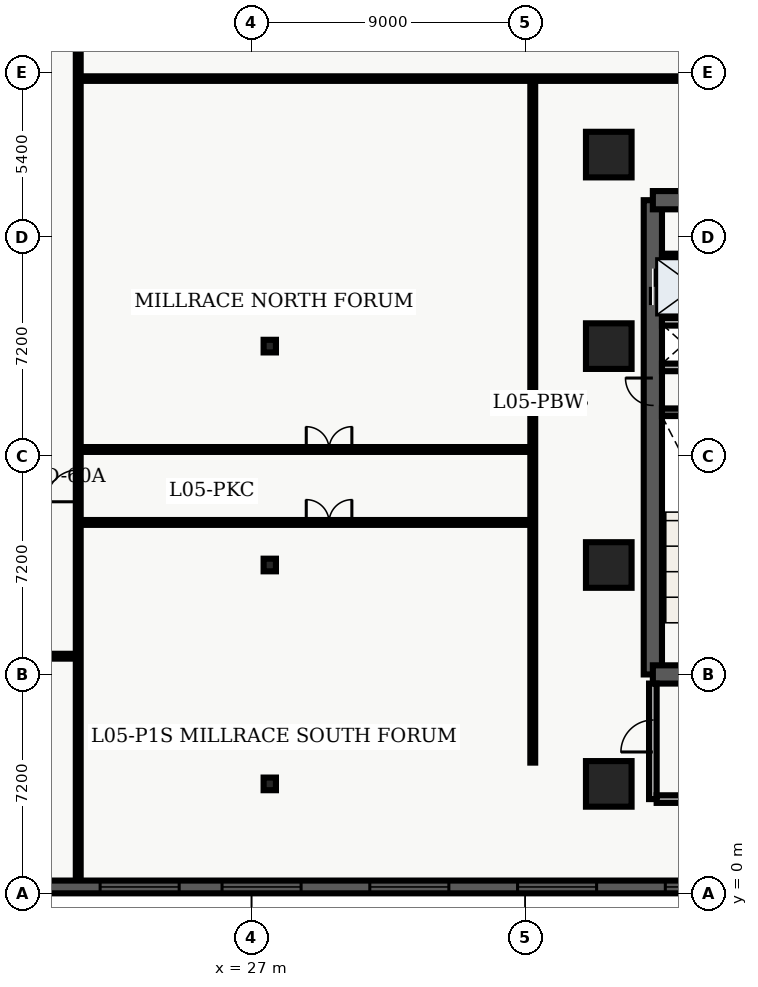
"""IFC4 building model, lengths in metres.
Left out: names, types, materials, properties, quantities, classifications, styles, units other than length and angle.
Written with IfcOpenShell. Run it as: python <this file> out.ifc"""

import sys

from ifc_helpers import new_model, entity, si_unit, converted_unit, direction, frame, origin_with_axes, origin_2d_with_axis, place, context, subcontext, project, spatial, polyline, rectangle, i_section, outline, extrude, element, fill, save


model = new_model("IFC4")
c1 = context("Model", 3, precision=1e-05, world=origin_with_axes(), true_north=direction((0.0, 1.0)))
c2 = subcontext(c1, "Body", "Model", "MODEL_VIEW")
j1 = project(units=[si_unit("LENGTHUNIT", "METRE"), converted_unit("PLANEANGLEUNIT", "DEGREE", entity("IfcPlaneAngleMeasure", 0.017), si_unit("PLANEANGLEUNIT", "RADIAN"), dimensions=[0, 0, 0, 0, 0, 0, 0])], contexts=[c1])
p1 = place(None, origin_with_axes())
s1 = spatial("IfcSite", under=j1, at=p1, CompositionType="ELEMENT")
p2 = place(p1, origin_with_axes())
s2 = spatial("IfcBuilding", under=s1, at=p2, CompositionType="ELEMENT")
p3 = place(p2, frame((0.0, 0.0, 24.3), z_axis=(0.0, 0.0, 1.0), x_axis=(1.0, 0.0, 0.0)))
s3 = spatial("IfcBuildingStorey", under=s2, at=p3, CompositionType="ELEMENT", Elevation=24.3)
p4 = place(p3, frame((40.2, 7.2, 0.0), z_axis=(0.0, 0.0, 1.0), x_axis=(0.0, 1.0, 0.0)))
e1 = element("IfcWall", 1, at=p4, inside=s3, PredefinedType="SHEAR", context=c2, shape_type="SweptSolid", body=[
    extrude(outline(polyline([(0.0, -0.3), (15.6, -0.3), (15.6, 0.3), (0.0, 0.3), (0.0, -0.3)])), origin_with_axes(), (0.0, 0.0, 1.0), 4.2),
])
p5 = place(p4, frame((12.75, 0.0, 0.0), z_axis=(0.0, 0.0, 1.0), x_axis=(1.0, 0.0, 0.0)))
e2 = element("IfcOpeningElement", 2, at=p5, cuts=e1, PredefinedType="OPENING", context=c2, shape_type="SweptSolid", body=[
    extrude(rectangle(XDim=1.2, YDim=0.62, at=origin_2d_with_axis()), origin_with_axes(), (0.0, 0.0, 1.0), 2.15),
])
p6 = place(p4, frame((9.3, 0.0, 0.0), z_axis=(0.0, 0.0, 1.0), x_axis=(1.0, 0.0, 0.0)))
e3 = element("IfcOpeningElement", 3, at=p6, cuts=e1, PredefinedType="OPENING", context=c2, shape_type="SweptSolid", body=[
    extrude(rectangle(XDim=0.9, YDim=0.62, at=origin_2d_with_axis()), origin_with_axes(), (0.0, 0.0, 1.0), 2.15),
])
p7 = place(p3, frame((40.2, 7.2, 0.0), z_axis=(0.0, 0.0, 1.0), x_axis=(1.0, 0.0, 0.0)))
e4 = element("IfcWall", 4, at=p7, inside=s3, PredefinedType="SHEAR", context=c2, shape_type="SweptSolid", body=[
    extrude(outline(polyline([(0.0, -0.3), (7.85, -0.3), (7.85, 0.3), (0.0, 0.3), (0.0, -0.3)])), origin_with_axes(), (0.0, 0.0, 1.0), 4.2),
])
p8 = place(p7, frame((2.175, 0.0, 0.0), z_axis=(0.0, 0.0, 1.0), x_axis=(1.0, 0.0, 0.0)))
e5 = element("IfcOpeningElement", 5, at=p8, cuts=e4, PredefinedType="OPENING", context=c2, shape_type="SweptSolid", body=[
    extrude(rectangle(XDim=1.05, YDim=0.62, at=origin_2d_with_axis()), origin_with_axes(), (0.0, 0.0, 1.0), 2.15),
])
p9 = place(p3, frame((40.2, 22.8, 0.0), z_axis=(0.0, 0.0, 1.0), x_axis=(1.0, 0.0, 0.0)))
e6 = element("IfcWall", 6, at=p9, inside=s3, PredefinedType="SHEAR", context=c2, shape_type="SweptSolid", body=[
    extrude(outline(polyline([(0.0, -0.3), (7.85, -0.3), (7.85, 0.3), (0.0, 0.3), (0.0, -0.3)])), origin_with_axes(), (0.0, 0.0, 1.0), 4.2),
])
p10 = place(p9, frame((5.775, 0.0, 0.0), z_axis=(0.0, 0.0, 1.0), x_axis=(1.0, 0.0, 0.0)))
e7 = element("IfcOpeningElement", 7, at=p10, cuts=e6, PredefinedType="OPENING", context=c2, shape_type="SweptSolid", body=[
    extrude(rectangle(XDim=1.05, YDim=0.62, at=origin_2d_with_axis()), origin_with_axes(), (0.0, 0.0, 1.0), 2.15),
])
p11 = place(p9, frame((2.15, 0.0, 0.0), z_axis=(0.0, 0.0, 1.0), x_axis=(1.0, 0.0, 0.0)))
e8 = element("IfcOpeningElement", 8, at=p11, cuts=e6, PredefinedType="OPENING", context=c2, shape_type="SweptSolid", body=[
    extrude(rectangle(XDim=0.9, YDim=0.62, at=origin_2d_with_axis()), origin_with_axes(), (0.0, 0.0, 1.0), 2.15),
])
p12 = place(p3, frame((40.5, 15.825, 0.0), z_axis=(0.0, 0.0, 1.0), x_axis=(1.0, 0.0, 0.0)))
e9 = element("IfcWall", 9, at=p12, inside=s3, PredefinedType="SHEAR", context=c2, shape_type="SweptSolid", body=[
    extrude(outline(polyline([(0.0, -0.125), (3.5, -0.125), (3.5, 0.125), (0.0, 0.125), (0.0, -0.125)])), origin_with_axes(), (0.0, 0.0, 1.0), 4.2),
])
p13 = place(p3, frame((40.5, 17.3, 0.0), z_axis=(0.0, 0.0, 1.0), x_axis=(1.0, 0.0, 0.0)))
e10 = element("IfcWall", 10, at=p13, inside=s3, PredefinedType="SOLIDWALL", context=c2, shape_type="SweptSolid", body=[
    extrude(outline(polyline([(0.0, -0.125), (3.5, -0.125), (3.5, 0.125), (0.0, 0.125), (0.0, -0.125)])), origin_with_axes(), (0.0, 0.0, 1.0), 3.24),
])
p14 = place(p13, frame((2.4, 0.0, 0.0), z_axis=(0.0, 0.0, 1.0), x_axis=(1.0, 0.0, 0.0)))
e11 = element("IfcOpeningElement", 11, at=p14, cuts=e10, PredefinedType="OPENING", context=c2, shape_type="SweptSolid", body=[
    extrude(rectangle(XDim=0.9, YDim=0.27, at=origin_2d_with_axis()), origin_with_axes(), (0.0, 0.0, 1.0), 2.15),
])
p15 = place(p3, frame((40.5, 18.8, 0.0), z_axis=(0.0, 0.0, 1.0), x_axis=(1.0, 0.0, 0.0)))
e12 = element("IfcWall", 12, at=p15, inside=s3, PredefinedType="SOLIDWALL", context=c2, shape_type="SweptSolid", body=[
    extrude(outline(polyline([(0.0, -0.125), (3.5, -0.125), (3.5, 0.125), (0.0, 0.125), (0.0, -0.125)])), origin_with_axes(), (0.0, 0.0, 1.0), 3.24),
])
p16 = place(p3, frame((40.2, 3.1, 0.0), z_axis=(0.0, 0.0, 1.0), x_axis=(0.0, 1.0, 0.0)))
e13 = element("IfcWall", 13, at=p16, inside=s3, PredefinedType="SOLIDWALL", context=c2, shape_type="SweptSolid", body=[
    extrude(outline(polyline([(0.0, -0.125), (3.8, -0.125), (3.8, 0.125), (0.0, 0.125), (0.0, -0.125)])), origin_with_axes(), (0.0, 0.0, 1.0), 3.24),
])
p17 = place(p16, frame((2.075, 0.0, 0.0), z_axis=(0.0, 0.0, 1.0), x_axis=(1.0, 0.0, 0.0)))
e14 = element("IfcOpeningElement", 14, at=p17, cuts=e13, PredefinedType="OPENING", context=c2, shape_type="SweptSolid", body=[
    extrude(rectangle(XDim=1.05, YDim=0.27, at=origin_2d_with_axis()), origin_with_axes(), (0.0, 0.0, 1.0), 2.15),
])
p18 = place(p3, frame((40.325, 3.1, 0.0), z_axis=(0.0, 0.0, 1.0), x_axis=(1.0, 0.0, 0.0)))
e15 = element("IfcWall", 15, at=p18, inside=s3, PredefinedType="SOLIDWALL", context=c2, shape_type="SweptSolid", body=[
    extrude(outline(polyline([(0.0, -0.125), (3.95, -0.125), (3.95, 0.125), (0.0, 0.125), (0.0, -0.125)])), origin_with_axes(), (0.0, 0.0, 1.0), 3.24),
])
for number, where, z_axis, x_axis in (
    (16, (27.6, 3.6, 0.0), (0.0, 0.0, 1.0), (1.0, 0.0, 0.0)),
    (17, (27.6, 10.8, 0.0), (0.0, 0.0, 1.0), (1.0, 0.0, 0.0)),
    (18, (27.6, 18.0, 0.0), (0.0, 0.0, 1.0), (1.0, 0.0, 0.0)),
):
    element("IfcColumn", number, at=place(p3, frame(where, z_axis=z_axis, x_axis=x_axis)), inside=s3, PredefinedType="COLUMN", context=c2, shape_type="SweptSolid", body=[
        extrude(i_section(OverallWidth=0.406, OverallDepth=0.416, WebThickness=0.03, FlangeThickness=0.048, FilletRadius=0.022, at=origin_2d_with_axis()), origin_with_axes(), (0.0, 0.0, 1.0), 4.5),
    ])
for number, where, z_axis, x_axis in (
    (19, (38.75, 3.6, 0.0), (0.0, 0.0, 1.0), (1.0, 0.0, 0.0)),
    (20, (38.75, 10.8, 0.0), (0.0, 0.0, 1.0), (1.0, 0.0, 0.0)),
    (21, (38.75, 18.0, 0.0), (0.0, 0.0, 1.0), (1.0, 0.0, 0.0)),
    (22, (38.75, 24.3, 0.0), (0.0, 0.0, 1.0), (1.0, 0.0, 0.0)),
):
    element("IfcColumn", number, at=place(p3, frame(where, z_axis=z_axis, x_axis=x_axis)), inside=s3, PredefinedType="COLUMN", context=c2, shape_type="SweptSolid", body=[
        extrude(rectangle(XDim=1.5, YDim=1.5, at=origin_2d_with_axis()), origin_with_axes(), (0.0, 0.0, 1.0), 4.5),
    ])
p19 = place(p3, frame((40.5, 20.96, 0.0), z_axis=(0.0, 0.0, 1.0), x_axis=(1.0, 0.0, 0.0)))
e23 = element("IfcWall", 23, at=p19, inside=s3, PredefinedType="PARTITIONING", context=c2, shape_type="SweptSolid", body=[
    extrude(outline(polyline([(0.0, -0.08), (3.5, -0.08), (3.5, 0.08), (0.0, 0.08), (0.0, -0.08)])), origin_with_axes(), (0.0, 0.0, 1.0), 3.2),
])
p20 = place(p3, frame((0.38, 7.8, 0.0), z_axis=(0.0, 0.0, 1.0), x_axis=(1.0, 0.0, 0.0)))
e24 = element("IfcWall", 24, at=p20, inside=s3, PredefinedType="PARTITIONING", context=c2, shape_type="SweptSolid", body=[
    extrude(outline(polyline([(0.0, -0.08), (20.92, -0.08), (20.92, 0.08), (0.0, 0.08), (0.0, -0.08)])), origin_with_axes(), (0.0, 0.0, 1.0), 3.2),
])
p21 = place(p20, frame((3.7, 0.0, 0.0), z_axis=(0.0, 0.0, 1.0), x_axis=(1.0, 0.0, 0.0)))
e25 = element("IfcOpeningElement", 25, at=p21, cuts=e24, PredefinedType="OPENING", context=c2, shape_type="SweptSolid", body=[
    extrude(rectangle(XDim=1.0, YDim=0.18, at=origin_2d_with_axis()), origin_with_axes(), (0.0, 0.0, 1.0), 2.15),
])
p22 = place(p20, frame((15.3, 0.0, 0.0), z_axis=(0.0, 0.0, 1.0), x_axis=(1.0, 0.0, 0.0)))
e26 = element("IfcOpeningElement", 26, at=p22, cuts=e24, PredefinedType="OPENING", context=c2, shape_type="SweptSolid", body=[
    extrude(rectangle(XDim=1.0, YDim=0.18, at=origin_2d_with_axis()), origin_with_axes(), (0.0, 0.0, 1.0), 2.15),
])
p23 = place(p3, frame((21.3, 0.38, 0.0), z_axis=(0.0, 0.0, 1.0), x_axis=(0.0, 1.0, 0.0)))
e27 = element("IfcWall", 27, at=p23, inside=s3, PredefinedType="PARTITIONING", context=c2, shape_type="SweptSolid", body=[
    extrude(outline(polyline([(0.0, -0.08), (35.24, -0.08), (35.24, 0.08), (0.0, 0.08), (0.0, -0.08)])), origin_with_axes(), (0.0, 0.0, 1.0), 3.2),
])
p24 = place(p23, frame((13.025, 0.0, 0.0), z_axis=(0.0, 0.0, 1.0), x_axis=(1.0, 0.0, 0.0)))
e28 = element("IfcOpeningElement", 28, at=p24, cuts=e27, PredefinedType="OPENING", context=c2, shape_type="SweptSolid", body=[
    extrude(rectangle(XDim=1.05, YDim=0.18, at=origin_2d_with_axis()), origin_with_axes(), (0.0, 0.0, 1.0), 2.15),
])
p25 = place(p23, frame((31.25, 0.0, 0.0), z_axis=(0.0, 0.0, 1.0), x_axis=(1.0, 0.0, 0.0)))
e29 = element("IfcOpeningElement", 29, at=p25, cuts=e27, PredefinedType="OPENING", context=c2, shape_type="SweptSolid", body=[
    extrude(rectangle(XDim=1.5, YDim=0.18, at=origin_2d_with_axis()), origin_with_axes(), (0.0, 0.0, 1.0), 2.2),
])
p26 = place(p3, frame((21.3, 12.2, 0.0), z_axis=(0.0, 0.0, 1.0), x_axis=(1.0, 0.0, 0.0)))
e30 = element("IfcWall", 30, at=p26, inside=s3, PredefinedType="PARTITIONING", context=c2, shape_type="SweptSolid", body=[
    extrude(outline(polyline([(0.0, -0.08), (14.95, -0.08), (14.95, 0.08), (0.0, 0.08), (0.0, -0.08)])), origin_with_axes(), (0.0, 0.0, 1.0), 3.2),
])
p27 = place(p26, frame((8.25, 0.0, 0.0), z_axis=(0.0, 0.0, 1.0), x_axis=(1.0, 0.0, 0.0)))
e31 = element("IfcOpeningElement", 31, at=p27, cuts=e30, PredefinedType="OPENING", context=c2, shape_type="SweptSolid", body=[
    extrude(rectangle(XDim=1.5, YDim=0.18, at=origin_2d_with_axis()), origin_with_axes(), (0.0, 0.0, 1.0), 2.2),
])
p28 = place(p3, frame((21.3, 14.6, 0.0), z_axis=(0.0, 0.0, 1.0), x_axis=(1.0, 0.0, 0.0)))
e32 = element("IfcWall", 32, at=p28, inside=s3, PredefinedType="PARTITIONING", context=c2, shape_type="SweptSolid", body=[
    extrude(outline(polyline([(0.0, -0.08), (14.95, -0.08), (14.95, 0.08), (0.0, 0.08), (0.0, -0.08)])), origin_with_axes(), (0.0, 0.0, 1.0), 3.2),
])
p29 = place(p28, frame((8.25, 0.0, 0.0), z_axis=(0.0, 0.0, 1.0), x_axis=(1.0, 0.0, 0.0)))
e33 = element("IfcOpeningElement", 33, at=p29, cuts=e32, PredefinedType="OPENING", context=c2, shape_type="SweptSolid", body=[
    extrude(rectangle(XDim=1.5, YDim=0.18, at=origin_2d_with_axis()), origin_with_axes(), (0.0, 0.0, 1.0), 2.2),
])
p30 = place(p3, frame((36.25, 4.3, 0.0), z_axis=(0.0, 0.0, 1.0), x_axis=(0.0, 1.0, 0.0)))
e34 = element("IfcWall", 34, at=p30, inside=s3, PredefinedType="PARTITIONING", context=c2, shape_type="SweptSolid", body=[
    extrude(outline(polyline([(0.0, -0.08), (22.5, -0.08), (22.5, 0.08), (0.0, 0.08), (0.0, -0.08)])), origin_with_axes(), (0.0, 0.0, 1.0), 3.2),
])
p31 = place(p3, frame((21.3, 26.8, 0.0), z_axis=(0.0, 0.0, 1.0), x_axis=(1.0, 0.0, 0.0)))
e35 = element("IfcWall", 35, at=p31, inside=s3, PredefinedType="PARTITIONING", context=c2, shape_type="SweptSolid", body=[
    extrude(outline(polyline([(0.0, -0.075), (29.25, -0.075), (29.25, 0.075), (0.0, 0.075), (0.0, -0.075)])), origin_with_axes(), (0.0, 0.0, 1.0), 3.2),
])
p32 = place(p3, frame((64.38, 0.21, 0.0), z_axis=(0.0, 0.0, 1.0), x_axis=(-1.0, 0.0, 0.0)))
e36 = element("IfcWall", 36, at=p32, inside=s3, PredefinedType="SOLIDWALL", context=c2, shape_type="SweptSolid", body=[
    extrude(outline(polyline([(0.0, -0.21), (64.38, -0.21), (64.38, 0.21), (0.0, 0.21), (0.0, -0.21)])), origin_with_axes(), (0.0, 0.0, 1.0), 4.2),
])
p33 = place(p32, frame((3.03, 0.0, 0.45), z_axis=(0.0, 0.0, 1.0), x_axis=(1.0, 0.0, 0.0)))
e37 = element("IfcOpeningElement", 37, at=p33, cuts=e36, PredefinedType="OPENING", context=c2, shape_type="SweptSolid", body=[
    extrude(rectangle(XDim=2.6, YDim=0.44, at=origin_2d_with_axis()), origin_with_axes(), (0.0, 0.0, 1.0), 2.8),
])
p34 = place(p32, frame((7.89, 0.0, 0.45), z_axis=(0.0, 0.0, 1.0), x_axis=(1.0, 0.0, 0.0)))
e38 = element("IfcOpeningElement", 38, at=p34, cuts=e36, PredefinedType="OPENING", context=c2, shape_type="SweptSolid", body=[
    extrude(rectangle(XDim=2.6, YDim=0.44, at=origin_2d_with_axis()), origin_with_axes(), (0.0, 0.0, 1.0), 2.8),
])
p35 = place(p32, frame((11.9, 0.0, 0.45), z_axis=(0.0, 0.0, 1.0), x_axis=(1.0, 0.0, 0.0)))
e39 = element("IfcOpeningElement", 39, at=p35, cuts=e36, PredefinedType="OPENING", context=c2, shape_type="SweptSolid", body=[
    extrude(rectangle(XDim=2.6, YDim=0.44, at=origin_2d_with_axis()), origin_with_axes(), (0.0, 0.0, 1.0), 2.8),
])
p36 = place(p32, frame((17.61, 0.0, 0.45), z_axis=(0.0, 0.0, 1.0), x_axis=(1.0, 0.0, 0.0)))
e40 = element("IfcOpeningElement", 40, at=p36, cuts=e36, PredefinedType="OPENING", context=c2, shape_type="SweptSolid", body=[
    extrude(rectangle(XDim=2.6, YDim=0.44, at=origin_2d_with_axis()), origin_with_axes(), (0.0, 0.0, 1.0), 2.8),
])
p37 = place(p32, frame((22.47, 0.0, 0.45), z_axis=(0.0, 0.0, 1.0), x_axis=(1.0, 0.0, 0.0)))
e41 = element("IfcOpeningElement", 41, at=p37, cuts=e36, PredefinedType="OPENING", context=c2, shape_type="SweptSolid", body=[
    extrude(rectangle(XDim=2.6, YDim=0.44, at=origin_2d_with_axis()), origin_with_axes(), (0.0, 0.0, 1.0), 2.8),
])
p38 = place(p32, frame((27.33, 0.0, 0.45), z_axis=(0.0, 0.0, 1.0), x_axis=(1.0, 0.0, 0.0)))
e42 = element("IfcOpeningElement", 42, at=p38, cuts=e36, PredefinedType="OPENING", context=c2, shape_type="SweptSolid", body=[
    extrude(rectangle(XDim=2.6, YDim=0.44, at=origin_2d_with_axis()), origin_with_axes(), (0.0, 0.0, 1.0), 2.8),
])
p39 = place(p32, frame((32.19, 0.0, 0.45), z_axis=(0.0, 0.0, 1.0), x_axis=(1.0, 0.0, 0.0)))
e43 = element("IfcOpeningElement", 43, at=p39, cuts=e36, PredefinedType="OPENING", context=c2, shape_type="SweptSolid", body=[
    extrude(rectangle(XDim=2.6, YDim=0.44, at=origin_2d_with_axis()), origin_with_axes(), (0.0, 0.0, 1.0), 2.8),
])
p40 = place(p32, frame((37.05, 0.0, 0.45), z_axis=(0.0, 0.0, 1.0), x_axis=(1.0, 0.0, 0.0)))
e44 = element("IfcOpeningElement", 44, at=p40, cuts=e36, PredefinedType="OPENING", context=c2, shape_type="SweptSolid", body=[
    extrude(rectangle(XDim=2.6, YDim=0.44, at=origin_2d_with_axis()), origin_with_axes(), (0.0, 0.0, 1.0), 2.8),
])
p41 = place(p32, frame((41.06, 0.0, 0.45), z_axis=(0.0, 0.0, 1.0), x_axis=(1.0, 0.0, 0.0)))
e45 = element("IfcOpeningElement", 45, at=p41, cuts=e36, PredefinedType="OPENING", context=c2, shape_type="SweptSolid", body=[
    extrude(rectangle(XDim=2.6, YDim=0.44, at=origin_2d_with_axis()), origin_with_axes(), (0.0, 0.0, 1.0), 2.8),
])
p42 = place(p32, frame((46.77, 0.0, 0.45), z_axis=(0.0, 0.0, 1.0), x_axis=(1.0, 0.0, 0.0)))
e46 = element("IfcOpeningElement", 46, at=p42, cuts=e36, PredefinedType="OPENING", context=c2, shape_type="SweptSolid", body=[
    extrude(rectangle(XDim=2.6, YDim=0.44, at=origin_2d_with_axis()), origin_with_axes(), (0.0, 0.0, 1.0), 2.8),
])
p43 = place(p32, frame((50.78, 0.0, 0.45), z_axis=(0.0, 0.0, 1.0), x_axis=(1.0, 0.0, 0.0)))
e47 = element("IfcOpeningElement", 47, at=p43, cuts=e36, PredefinedType="OPENING", context=c2, shape_type="SweptSolid", body=[
    extrude(rectangle(XDim=2.6, YDim=0.44, at=origin_2d_with_axis()), origin_with_axes(), (0.0, 0.0, 1.0), 2.8),
])
p44 = place(p32, frame((56.49, 0.0, 0.45), z_axis=(0.0, 0.0, 1.0), x_axis=(1.0, 0.0, 0.0)))
e48 = element("IfcOpeningElement", 48, at=p44, cuts=e36, PredefinedType="OPENING", context=c2, shape_type="SweptSolid", body=[
    extrude(rectangle(XDim=2.6, YDim=0.44, at=origin_2d_with_axis()), origin_with_axes(), (0.0, 0.0, 1.0), 2.8),
])
p45 = place(p32, frame((61.35, 0.0, 0.45), z_axis=(0.0, 0.0, 1.0), x_axis=(1.0, 0.0, 0.0)))
e49 = element("IfcOpeningElement", 49, at=p45, cuts=e36, PredefinedType="OPENING", context=c2, shape_type="SweptSolid", body=[
    extrude(rectangle(XDim=2.6, YDim=0.44, at=origin_2d_with_axis()), origin_with_axes(), (0.0, 0.0, 1.0), 2.8),
])
p46 = place(p4, frame((12.75, 0.0, 0.0), z_axis=(0.0, 0.0, 1.0), x_axis=(1.0, 0.0, 0.0)))
e50 = element("IfcDoor", 50, at=p46, inside=s3, OperationType="DOUBLE_DOOR_SLIDING", PredefinedType="DOOR", context=c2, shape_type="SweptSolid", body=[
    extrude(rectangle(XDim=1.2, YDim=0.09, at=origin_2d_with_axis()), origin_with_axes(), (0.0, 0.0, 1.0), 2.15),
])
fill(e2, e50)
p47 = place(p4, frame((9.3, 0.0, 0.0), z_axis=(0.0, 0.0, 1.0), x_axis=(1.0, 0.0, 0.0)))
e51 = element("IfcDoor", 51, at=p47, inside=s3, OperationType="SINGLE_SWING_RIGHT", PredefinedType="DOOR", context=c2, shape_type="SweptSolid", body=[
    extrude(rectangle(XDim=0.9, YDim=0.09, at=origin_2d_with_axis()), origin_with_axes(), (0.0, 0.0, 1.0), 2.15),
])
fill(e3, e51)
p48 = place(p16, frame((2.075, 0.0, 0.0), z_axis=(0.0, 0.0, 1.0), x_axis=(1.0, 0.0, 0.0)))
e52 = element("IfcDoor", 52, at=p48, inside=s3, OperationType="SINGLE_SWING_LEFT", PredefinedType="DOOR", context=c2, shape_type="SweptSolid", body=[
    extrude(rectangle(XDim=1.05, YDim=0.09, at=origin_2d_with_axis()), origin_with_axes(), (0.0, 0.0, 1.0), 2.15),
])
fill(e14, e52)
p49 = place(p23, frame((13.025, 0.0, 0.0), z_axis=(0.0, 0.0, 1.0), x_axis=(1.0, 0.0, 0.0)))
e53 = element("IfcDoor", 53, at=p49, inside=s3, OperationType="SINGLE_SWING_LEFT", PredefinedType="DOOR", context=c2, shape_type="SweptSolid", body=[
    extrude(rectangle(XDim=1.05, YDim=0.09, at=origin_2d_with_axis()), origin_with_axes(), (0.0, 0.0, 1.0), 2.15),
])
fill(e28, e53)
p50 = place(p26, frame((8.25, 0.0, 0.0), z_axis=(0.0, 0.0, 1.0), x_axis=(1.0, 0.0, 0.0)))
e54 = element("IfcDoor", 54, at=p50, inside=s3, OperationType="DOUBLE_DOOR_SINGLE_SWING", PredefinedType="DOOR", context=c2, shape_type="SweptSolid", body=[
    extrude(rectangle(XDim=1.5, YDim=0.09, at=origin_2d_with_axis()), origin_with_axes(), (0.0, 0.0, 1.0), 2.2),
])
fill(e31, e54)
p51 = place(p28, frame((8.25, 0.0, 0.0), z_axis=(0.0, 0.0, 1.0), x_axis=(1.0, 0.0, 0.0)))
e55 = element("IfcDoor", 55, at=p51, inside=s3, OperationType="DOUBLE_DOOR_SINGLE_SWING", PredefinedType="DOOR", context=c2, shape_type="SweptSolid", body=[
    extrude(rectangle(XDim=1.5, YDim=0.09, at=origin_2d_with_axis()), origin_with_axes(), (0.0, 0.0, 1.0), 2.2),
])
fill(e33, e55)
p52 = place(p32, frame((22.47, 0.0, 0.45), z_axis=(0.0, 0.0, 1.0), x_axis=(1.0, 0.0, 0.0)))
e56 = element("IfcWindow", 56, at=p52, inside=s3, PredefinedType="WINDOW", context=c2, shape_type="SweptSolid", body=[
    extrude(rectangle(XDim=2.6, YDim=0.09, at=origin_2d_with_axis()), origin_with_axes(), (0.0, 0.0, 1.0), 2.8),
])
fill(e41, e56)
p53 = place(p32, frame((27.33, 0.0, 0.45), z_axis=(0.0, 0.0, 1.0), x_axis=(1.0, 0.0, 0.0)))
e57 = element("IfcWindow", 57, at=p53, inside=s3, PredefinedType="WINDOW", context=c2, shape_type="SweptSolid", body=[
    extrude(rectangle(XDim=2.6, YDim=0.09, at=origin_2d_with_axis()), origin_with_axes(), (0.0, 0.0, 1.0), 2.8),
])
fill(e42, e57)
p54 = place(p32, frame((32.19, 0.0, 0.45), z_axis=(0.0, 0.0, 1.0), x_axis=(1.0, 0.0, 0.0)))
e58 = element("IfcWindow", 58, at=p54, inside=s3, PredefinedType="WINDOW", context=c2, shape_type="SweptSolid", body=[
    extrude(rectangle(XDim=2.6, YDim=0.09, at=origin_2d_with_axis()), origin_with_axes(), (0.0, 0.0, 1.0), 2.8),
])
fill(e43, e58)
p55 = place(p32, frame((37.05, 0.0, 0.45), z_axis=(0.0, 0.0, 1.0), x_axis=(1.0, 0.0, 0.0)))
e59 = element("IfcWindow", 59, at=p55, inside=s3, PredefinedType="WINDOW", context=c2, shape_type="SweptSolid", body=[
    extrude(rectangle(XDim=2.6, YDim=0.09, at=origin_2d_with_axis()), origin_with_axes(), (0.0, 0.0, 1.0), 2.8),
])
fill(e44, e59)
p56 = place(p32, frame((41.06, 0.0, 0.45), z_axis=(0.0, 0.0, 1.0), x_axis=(1.0, 0.0, 0.0)))
e60 = element("IfcWindow", 60, at=p56, inside=s3, PredefinedType="WINDOW", context=c2, shape_type="SweptSolid", body=[
    extrude(rectangle(XDim=2.6, YDim=0.09, at=origin_2d_with_axis()), origin_with_axes(), (0.0, 0.0, 1.0), 2.8),
])
fill(e45, e60)
save(model, sys.argv[1])
